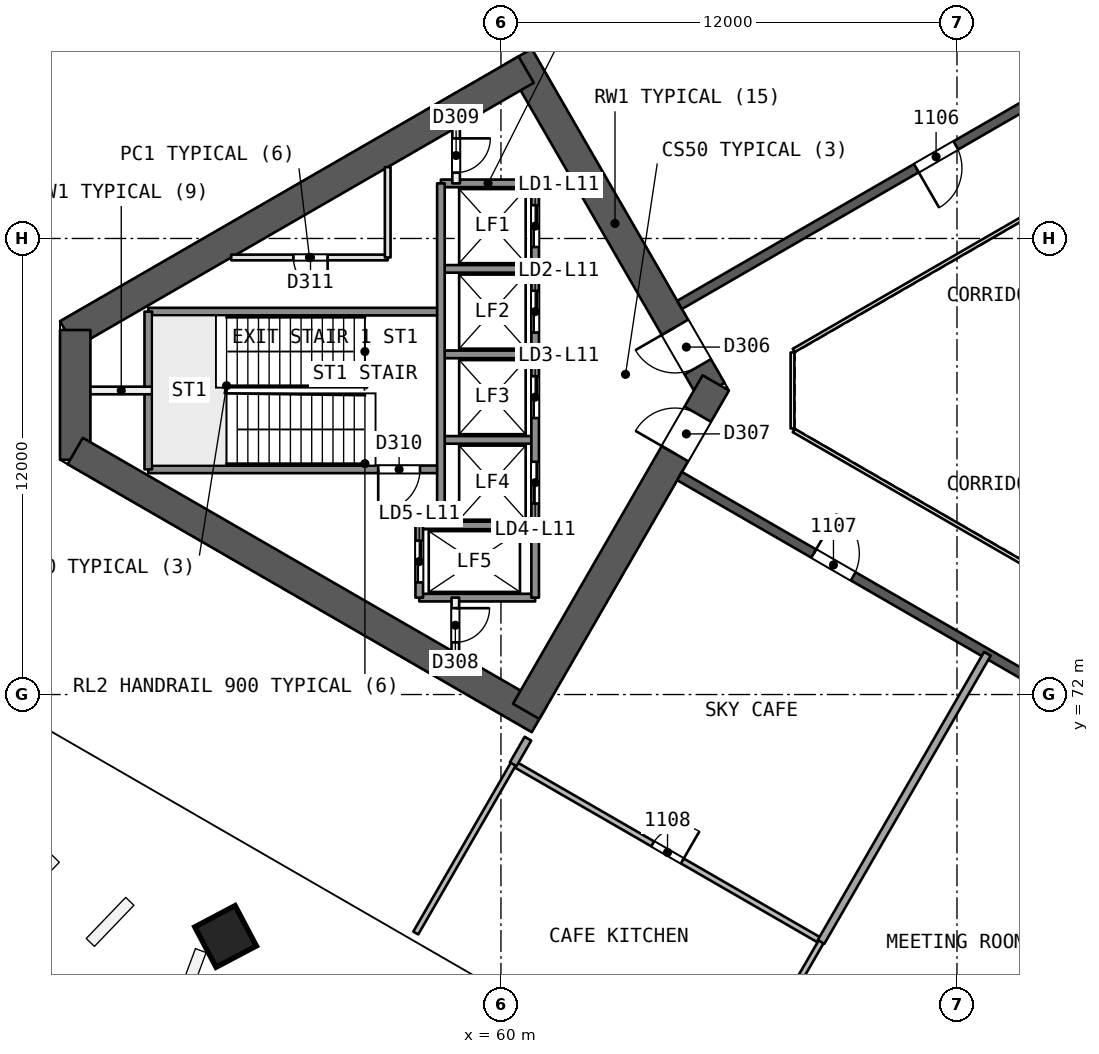
"""IFC4 building model, lengths in metres.
Left out: names, types, materials, properties, quantities, classifications, styles, units other than length and angle.
Written with IfcOpenShell. Run it as: python <this file> out.ifc"""

import sys

from ifc_helpers import new_model, si_unit, direction, frame, frame_2d, origin, origin_2d, place, context, subcontext, project, spatial, rectangle, extrude, element, fill, save


model = new_model("IFC4")
c1 = context("Model", 3, precision=1e-05, world=origin(), true_north=direction((0.0, 1.0)))
c2 = subcontext(c1, "Body", "Model", "MODEL_VIEW")
j1 = project(units=[si_unit("LENGTHUNIT", "METRE"), si_unit("PLANEANGLEUNIT", "RADIAN")], contexts=[c1])
p1 = place(None, origin())
s1 = spatial("IfcSite", under=j1, at=p1, CompositionType="ELEMENT")
p2 = place(p1, origin())
s2 = spatial("IfcBuilding", under=s1, at=p2, CompositionType="ELEMENT")
p3 = place(p2, frame((0.0, 0.0, 52.9)))
s3 = spatial("IfcBuildingStorey", under=s2, at=p3, CompositionType="ELEMENT", Elevation=52.9)
p4 = place(p3, frame((65.538, 80.0, 0.0), z_axis=(0.0, 0.0, 1.0), x_axis=(-0.49999662545, 0.866027352073, 0.0)))
e1 = element("IfcWall", 1, at=p4, inside=s3, PredefinedType="SHEAR", context=c2, shape_type="SweptSolid", body=[
    extrude(rectangle(XDim=10.149, YDim=0.8, at=frame_2d((5.074, 0.0))), origin(), (0.0, 0.0, 1.0), 4.4),
])
p5 = place(p4, frame((0.719, 0.0, 0.0)))
e2 = element("IfcOpeningElement", 2, at=p5, cuts=e1, PredefinedType="OPENING", context=c2, shape_type="SweptSolid", body=[
    extrude(rectangle(XDim=1.2, YDim=2.1, at=frame_2d((0.6, 1.05))), frame((0.0, 0.411, 0.0), z_axis=(0.0, -1.0, 0.0), x_axis=(1.0, 0.0, 0.0)), (0.0, 0.0, 1.0), 0.821),
])
p6 = place(p3, frame((60.664, 88.443, 0.0), z_axis=(0.0, 0.0, 1.0), x_axis=(-0.866029478545, -0.499992942241, 0.0)))
e3 = element("IfcWall", 3, at=p6, inside=s3, PredefinedType="SHEAR", context=c2, shape_type="SweptSolid", body=[
    extrude(rectangle(XDim=13.933, YDim=0.8, at=frame_2d((6.967, 0.0))), origin(), (0.0, 0.0, 1.0), 4.4),
])
p7 = place(p3, frame((48.797, 81.592, 0.0), z_axis=(0.0, 0.0, 1.0), x_axis=(0.0, -1.0, 0.0)))
e4 = element("IfcWall", 4, at=p7, inside=s3, PredefinedType="SHEAR", context=c2, shape_type="SweptSolid", body=[
    extrude(rectangle(XDim=3.415, YDim=0.8, at=frame_2d((1.707, 0.0))), origin(), (0.0, 0.0, 1.0), 4.4),
])
p8 = place(p3, frame((48.797, 78.408, 0.0), z_axis=(0.0, 0.0, 1.0), x_axis=(0.866032504327, -0.499987701298, 0.0)))
e5 = element("IfcWall", 5, at=p8, inside=s3, PredefinedType="SHEAR", context=c2, shape_type="SweptSolid", body=[
    extrude(rectangle(XDim=14.102, YDim=0.8, at=frame_2d((7.051, 0.0))), origin(), (0.0, 0.0, 1.0), 4.4),
])
p9 = place(p3, frame((60.664, 71.557, 0.0), z_axis=(0.0, 0.0, 1.0), x_axis=(0.50000409368, 0.866023040284, 0.0)))
e6 = element("IfcWall", 6, at=p9, inside=s3, PredefinedType="SHEAR", context=c2, shape_type="SweptSolid", body=[
    extrude(rectangle(XDim=9.98, YDim=0.8, at=frame_2d((4.99, 0.0))), origin(), (0.0, 0.0, 1.0), 4.4),
])
p10 = place(p9, frame((7.83, 0.0, 0.0)))
e7 = element("IfcOpeningElement", 7, at=p10, cuts=e6, PredefinedType="OPENING", context=c2, shape_type="SweptSolid", body=[
    extrude(rectangle(XDim=1.2, YDim=2.1, at=frame_2d((0.6, 1.05))), frame((0.0, 0.411, 0.0), z_axis=(0.0, -1.0, 0.0), x_axis=(1.0, 0.0, 0.0)), (0.0, 0.0, 1.0), 0.821),
])
p11 = place(p3, frame((78.2, 90.046, 0.0), z_axis=(0.0, 0.0, 1.0), x_axis=(-0.866026492143, -0.499998114903, 0.0)))
e8 = element("IfcWall", 8, at=p11, inside=s3, PredefinedType="SHEAR", context=c2, shape_type="SweptSolid", body=[
    extrude(rectangle(XDim=15.588, YDim=0.25, at=frame_2d((7.794, 0.0))), origin(), (0.0, 0.0, 1.0), 3.9),
])
p12 = place(p11, frame((7.194, 0.0, 0.0)))
e9 = element("IfcOpeningElement", 9, at=p12, cuts=e8, PredefinedType="OPENING", context=c2, shape_type="SweptSolid", body=[
    extrude(rectangle(XDim=1.2, YDim=2.4, at=frame_2d((0.6, 1.2))), frame((0.0, 0.135, 0.0), z_axis=(0.0, -1.0, 0.0), x_axis=(1.0, 0.0, 0.0)), (0.0, 0.0, 1.0), 0.271),
])
p13 = place(p3, frame((64.7, 77.748, 0.0), z_axis=(0.0, 0.0, 1.0), x_axis=(0.866026492143, -0.499998114903, 0.0)))
e10 = element("IfcWall", 10, at=p13, inside=s3, PredefinedType="SHEAR", context=c2, shape_type="SweptSolid", body=[
    extrude(rectangle(XDim=15.588, YDim=0.25, at=frame_2d((7.794, 0.0))), origin(), (0.0, 0.0, 1.0), 3.9),
])
p14 = place(p13, frame((4.076, 0.0, 0.0)))
e11 = element("IfcOpeningElement", 11, at=p14, cuts=e10, PredefinedType="OPENING", context=c2, shape_type="SweptSolid", body=[
    extrude(rectangle(XDim=1.2, YDim=2.4, at=frame_2d((0.6, 1.2))), frame((0.0, 0.135, 0.0), z_axis=(0.0, -1.0, 0.0), x_axis=(1.0, 0.0, 0.0)), (0.0, 0.0, 1.0), 0.271),
])
p15 = place(p13, frame((11.871, 0.0, 0.0)))
e12 = element("IfcOpeningElement", 12, at=p15, cuts=e10, PredefinedType="OPENING", context=c2, shape_type="SweptSolid", body=[
    extrude(rectangle(XDim=1.2, YDim=2.4, at=frame_2d((0.6, 1.2))), frame((0.0, 0.135, 0.0), z_axis=(0.0, -1.0, 0.0), x_axis=(1.0, 0.0, 0.0)), (0.0, 0.0, 1.0), 0.271),
])
p16 = place(p3, frame((52.731, 65.62, 0.0), z_axis=(0.019303638282, 0.012147979264, 0.999739864239), x_axis=(-0.866164087887, 0.499646157015, 0.010653198369)))
e13 = element("IfcColumn", 13, at=p16, inside=s3, PredefinedType="COLUMN", context=c2, shape_type="SweptSolid", body=[
    extrude(rectangle(XDim=1.2, YDim=1.2, at=origin_2d()), origin(), (0.0, 0.0, 1.0), 4.401),
])
p17 = place(p3, frame((60.333, 70.184, 0.0), z_axis=(0.0, 0.0, 1.0), x_axis=(0.866029102363, -0.49999359382, 0.0)))
e14 = element("IfcWall", 14, at=p17, inside=s3, PredefinedType="PARTITIONING", context=c2, shape_type="SweptSolid", body=[
    extrude(rectangle(XDim=9.353, YDim=0.15, at=frame_2d((4.677, 0.0))), origin(), (0.0, 0.0, 1.0), 3.9),
])
p18 = place(p17, frame((4.227, 0.0, 0.0)))
e15 = element("IfcOpeningElement", 15, at=p18, cuts=e14, PredefinedType="OPENING", context=c2, shape_type="SweptSolid", body=[
    extrude(rectangle(XDim=0.9, YDim=2.1, at=frame_2d((0.45, 1.05))), frame((0.0, 0.085, 0.0), z_axis=(0.0, -1.0, 0.0), x_axis=(1.0, 0.0, 0.0)), (0.0, 0.0, 1.0), 0.171),
])
p19 = place(p3, frame((68.423, 65.49, 0.0), z_axis=(0.0, 0.0, 1.0), x_axis=(0.499999262521, 0.866025829568, 0.0)))
e16 = element("IfcWall", 16, at=p19, inside=s3, PredefinedType="PARTITIONING", context=c2, shape_type="SweptSolid", body=[
    extrude(rectangle(XDim=8.754, YDim=0.2, at=frame_2d((4.377, 0.0))), origin(), (0.0, 0.0, 1.0), 3.9),
])
p20 = place(p3, frame((60.323, 70.167, 0.0), z_axis=(0.0, 0.0, 1.0), x_axis=(0.499931386026, 0.866065014457, 0.0)))
e17 = element("IfcWall", 17, at=p20, inside=s3, PredefinedType="PARTITIONING", context=c2, shape_type="SweptSolid", body=[
    extrude(rectangle(XDim=0.775, YDim=0.2, at=frame_2d((0.388, 0.0))), origin(), (0.0, 0.0, 1.0), 3.9),
])
for number, where, z_axis, x_axis in (
    (18, (65.858, 61.048, 0.0), (0.0, 0.0, 1.0), (0.5, 0.866, 0.0)),
    (19, (57.758, 65.725, 0.0), (0.0, 0.0, 1.0), (0.5, 0.866, 0.0)),
):
    element("IfcWall", number, at=place(p3, frame(where, z_axis=z_axis, x_axis=x_axis)), inside=s3, PredefinedType="PARTITIONING", context=c2, shape_type="SweptSolid", body=[
        extrude(rectangle(XDim=5.169, YDim=0.15, at=frame_2d((2.585, 0.0))), origin(), (0.0, 0.0, 1.0), 3.9),
    ])
p21 = place(p3, frame((60.9, 85.45, 0.0), z_axis=(0.0, 0.0, 1.0), x_axis=(-1.0, 0.0, 0.0)))
e20 = element("IfcWall", 20, at=p21, inside=s3, PredefinedType="SOLIDWALL", context=c2, shape_type="SweptSolid", body=[
    extrude(rectangle(XDim=2.48, YDim=0.2, at=frame_2d((1.24, 0.0))), origin(), (0.0, 0.0, 1.0), 3.9),
])
p22 = place(p3, frame((57.02, 83.5, 0.0), z_axis=(0.0, 0.0, 1.0), x_axis=(-1.0, 0.0, 0.0)))
e21 = element("IfcWall", 21, at=p22, inside=s3, PredefinedType="PARTITIONING", context=c2, shape_type="SweptSolid", body=[
    extrude(rectangle(XDim=4.118, YDim=0.15, at=frame_2d((2.059, 0.0))), origin(), (0.0, 0.0, 1.0), 3.9),
])
p23 = place(p22, frame((1.582, 0.0, 0.0)))
e22 = element("IfcOpeningElement", 22, at=p23, cuts=e21, PredefinedType="OPENING", context=c2, shape_type="SweptSolid", body=[
    extrude(rectangle(XDim=0.9, YDim=2.1, at=frame_2d((0.45, 1.05))), frame((0.0, 0.085, 0.0), z_axis=(0.0, -1.0, 0.0), x_axis=(1.0, 0.0, 0.0)), (0.0, 0.0, 1.0), 0.171),
])
p24 = place(p3, frame((60.9, 83.2, 0.0), z_axis=(0.0, 0.0, 1.0), x_axis=(-1.0, 0.0, 0.0)))
e23 = element("IfcWall", 23, at=p24, inside=s3, PredefinedType="SOLIDWALL", context=c2, shape_type="SweptSolid", body=[
    extrude(rectangle(XDim=2.48, YDim=0.2, at=frame_2d((1.24, 0.0))), origin(), (0.0, 0.0, 1.0), 3.9),
])
p25 = place(p3, frame((58.42, 82.075, 0.0), z_axis=(0.0, 0.0, 1.0), x_axis=(-1.0, 0.0, 0.0)))
e24 = element("IfcWall", 24, at=p25, inside=s3, PredefinedType="SOLIDWALL", context=c2, shape_type="SweptSolid", body=[
    extrude(rectangle(XDim=7.7, YDim=0.2, at=frame_2d((3.85, 0.0))), origin(), (0.0, 0.0, 1.0), 3.9),
])
p26 = place(p3, frame((60.9, 80.95, 0.0), z_axis=(0.0, 0.0, 1.0), x_axis=(-1.0, 0.0, 0.0)))
e25 = element("IfcWall", 25, at=p26, inside=s3, PredefinedType="SOLIDWALL", context=c2, shape_type="SweptSolid", body=[
    extrude(rectangle(XDim=2.48, YDim=0.2, at=frame_2d((1.24, 0.0))), origin(), (0.0, 0.0, 1.0), 3.9),
])
p27 = place(p3, frame((50.82, 80.0, 0.0), z_axis=(0.0, 0.0, 1.0), x_axis=(-1.0, 0.0, 0.0)))
e26 = element("IfcWall", 26, at=p27, inside=s3, PredefinedType="PARTITIONING", context=c2, shape_type="SweptSolid", body=[
    extrude(rectangle(XDim=1.623, YDim=0.2, at=frame_2d((0.812, 0.0))), origin(), (0.0, 0.0, 1.0), 3.9),
])
p28 = place(p3, frame((60.9, 78.7, 0.0), z_axis=(0.0, 0.0, 1.0), x_axis=(-1.0, 0.0, 0.0)))
e27 = element("IfcWall", 27, at=p28, inside=s3, PredefinedType="SOLIDWALL", context=c2, shape_type="SweptSolid", body=[
    extrude(rectangle(XDim=2.48, YDim=0.2, at=frame_2d((1.24, 0.0))), origin(), (0.0, 0.0, 1.0), 3.9),
])
p29 = place(p3, frame((58.42, 77.925, 0.0), z_axis=(0.0, 0.0, 1.0), x_axis=(-1.0, 0.0, 0.0)))
e28 = element("IfcWall", 28, at=p29, inside=s3, PredefinedType="SOLIDWALL", context=c2, shape_type="SweptSolid", body=[
    extrude(rectangle(XDim=7.7, YDim=0.2, at=frame_2d((3.85, 0.0))), origin(), (0.0, 0.0, 1.0), 3.9),
])
p30 = place(p29, frame((0.55, 0.0, 0.0)))
e29 = element("IfcOpeningElement", 29, at=p30, cuts=e28, PredefinedType="OPENING", context=c2, shape_type="SweptSolid", body=[
    extrude(rectangle(XDim=1.1, YDim=2.1, at=frame_2d((0.55, 1.05))), frame((0.0, 0.11, 0.0), z_axis=(0.0, -1.0, 0.0), x_axis=(1.0, 0.0, 0.0)), (0.0, 0.0, 1.0), 0.221),
])
for number, where, z_axis, x_axis in (
    (30, (60.9, 76.45, 0.0), (0.0, 0.0, 1.0), (-1.0, 0.0, 0.0)),
    (31, (60.9, 74.55, 0.0), (0.0, 0.0, 1.0), (-1.0, 0.0, 0.0)),
):
    element("IfcWall", number, at=place(p3, frame(where, z_axis=z_axis, x_axis=x_axis)), inside=s3, PredefinedType="SOLIDWALL", context=c2, shape_type="SweptSolid", body=[
        extrude(rectangle(XDim=3.05, YDim=0.2, at=frame_2d((1.525, 0.0))), origin(), (0.0, 0.0, 1.0), 3.9),
    ])
p31 = place(p3, frame((60.9, 85.45, 0.0), z_axis=(0.0, 0.0, 1.0), x_axis=(0.0, -1.0, 0.0)))
e32 = element("IfcWall", 32, at=p31, inside=s3, PredefinedType="SOLIDWALL", context=c2, shape_type="SweptSolid", body=[
    extrude(rectangle(XDim=10.9, YDim=0.2, at=frame_2d((5.45, 0.0))), origin(), (0.0, 0.0, 1.0), 3.9),
])
p32 = place(p31, frame((0.575, 0.0, 0.0)))
e33 = element("IfcOpeningElement", 33, at=p32, cuts=e32, PredefinedType="OPENING", context=c2, shape_type="SweptSolid", body=[
    extrude(rectangle(XDim=1.1, YDim=2.1, at=frame_2d((0.55, 1.05))), frame((0.0, 0.11, 0.0), z_axis=(0.0, -1.0, 0.0), x_axis=(1.0, 0.0, 0.0)), (0.0, 0.0, 1.0), 0.221),
])
p33 = place(p31, frame((2.825, 0.0, 0.0)))
e34 = element("IfcOpeningElement", 34, at=p33, cuts=e32, PredefinedType="OPENING", context=c2, shape_type="SweptSolid", body=[
    extrude(rectangle(XDim=1.1, YDim=2.1, at=frame_2d((0.55, 1.05))), frame((0.0, 0.11, 0.0), z_axis=(0.0, -1.0, 0.0), x_axis=(1.0, 0.0, 0.0)), (0.0, 0.0, 1.0), 0.221),
])
p34 = place(p31, frame((5.075, 0.0, 0.0)))
e35 = element("IfcOpeningElement", 35, at=p34, cuts=e32, PredefinedType="OPENING", context=c2, shape_type="SweptSolid", body=[
    extrude(rectangle(XDim=1.1, YDim=2.1, at=frame_2d((0.55, 1.05))), frame((0.0, 0.11, 0.0), z_axis=(0.0, -1.0, 0.0), x_axis=(1.0, 0.0, 0.0)), (0.0, 0.0, 1.0), 0.221),
])
p35 = place(p31, frame((7.325, 0.0, 0.0)))
e36 = element("IfcOpeningElement", 36, at=p35, cuts=e32, PredefinedType="OPENING", context=c2, shape_type="SweptSolid", body=[
    extrude(rectangle(XDim=1.1, YDim=2.1, at=frame_2d((0.55, 1.05))), frame((0.0, 0.11, 0.0), z_axis=(0.0, -1.0, 0.0), x_axis=(1.0, 0.0, 0.0)), (0.0, 0.0, 1.0), 0.221),
])
p36 = place(p3, frame((58.82, 86.917, 0.0), z_axis=(0.0, 0.0, 1.0), x_axis=(0.0, -1.0, 0.0)))
e37 = element("IfcWall", 37, at=p36, inside=s3, PredefinedType="PARTITIONING", context=c2, shape_type="SweptSolid", body=[
    extrude(rectangle(XDim=1.467, YDim=0.2, at=frame_2d((0.733, 0.0))), origin(), (0.0, 0.0, 1.0), 3.9),
])
p37 = place(p36, frame((0.283, 0.0, 0.0)))
e38 = element("IfcOpeningElement", 38, at=p37, cuts=e37, PredefinedType="OPENING", context=c2, shape_type="SweptSolid", body=[
    extrude(rectangle(XDim=0.9, YDim=2.1, at=frame_2d((0.45, 1.05))), frame((0.0, 0.11, 0.0), z_axis=(0.0, -1.0, 0.0), x_axis=(1.0, 0.0, 0.0)), (0.0, 0.0, 1.0), 0.221),
])
p38 = place(p3, frame((58.8, 74.55, 0.0), z_axis=(0.0, 0.0, 1.0), x_axis=(0.0, -1.0, 0.0)))
e39 = element("IfcWall", 39, at=p38, inside=s3, PredefinedType="PARTITIONING", context=c2, shape_type="SweptSolid", body=[
    extrude(rectangle(XDim=1.455, YDim=0.2, at=frame_2d((0.728, 0.0))), origin(), (0.0, 0.0, 1.0), 3.9),
])
p39 = place(p38, frame((0.278, 0.0, 0.0)))
e40 = element("IfcOpeningElement", 40, at=p39, cuts=e39, PredefinedType="OPENING", context=c2, shape_type="SweptSolid", body=[
    extrude(rectangle(XDim=0.9, YDim=2.1, at=frame_2d((0.45, 1.05))), frame((0.0, 0.11, 0.0), z_axis=(0.0, -1.0, 0.0), x_axis=(1.0, 0.0, 0.0)), (0.0, 0.0, 1.0), 0.221),
])
p40 = place(p3, frame((58.42, 85.45, 0.0), z_axis=(0.0, 0.0, 1.0), x_axis=(0.0, -1.0, 0.0)))
e41 = element("IfcWall", 41, at=p40, inside=s3, PredefinedType="SOLIDWALL", context=c2, shape_type="SweptSolid", body=[
    extrude(rectangle(XDim=9.0, YDim=0.2, at=frame_2d((4.5, 0.0))), origin(), (0.0, 0.0, 1.0), 3.9),
])
p41 = place(p3, frame((57.85, 76.45, 0.0), z_axis=(0.0, 0.0, 1.0), x_axis=(0.0, -1.0, 0.0)))
e42 = element("IfcWall", 42, at=p41, inside=s3, PredefinedType="SOLIDWALL", context=c2, shape_type="SweptSolid", body=[
    extrude(rectangle(XDim=1.9, YDim=0.2, at=frame_2d((0.95, 0.0))), origin(), (0.0, 0.0, 1.0), 3.9),
])
p42 = place(p41, frame((0.4, 0.0, 0.0)))
e43 = element("IfcOpeningElement", 43, at=p42, cuts=e42, PredefinedType="OPENING", context=c2, shape_type="SweptSolid", body=[
    extrude(rectangle(XDim=1.1, YDim=2.1, at=frame_2d((0.55, 1.05))), frame((0.0, 0.11, 0.0), z_axis=(0.0, -1.0, 0.0), x_axis=(1.0, 0.0, 0.0)), (0.0, 0.0, 1.0), 0.221),
])
p43 = place(p3, frame((57.02, 85.877, 0.0), z_axis=(0.0, 0.0, 1.0), x_axis=(0.0, -1.0, 0.0)))
e44 = element("IfcWall", 44, at=p43, inside=s3, PredefinedType="PARTITIONING", context=c2, shape_type="SweptSolid", body=[
    extrude(rectangle(XDim=2.377, YDim=0.15, at=frame_2d((1.189, 0.0))), origin(), (0.0, 0.0, 1.0), 3.9),
])
p44 = place(p3, frame((50.72, 82.075, 0.0), z_axis=(0.0, 0.0, 1.0), x_axis=(0.0, -1.0, 0.0)))
e45 = element("IfcWall", 45, at=p44, inside=s3, PredefinedType="SOLIDWALL", context=c2, shape_type="SweptSolid", body=[
    extrude(rectangle(XDim=4.15, YDim=0.2, at=frame_2d((2.075, 0.0))), origin(), (0.0, 0.0, 1.0), 3.9),
])
p45 = place(p3, frame((77.738, 86.846, 0.0), z_axis=(0.0, 0.0, 1.0), x_axis=(-0.866026658274, -0.499997827154, 0.0)))
e46 = element("IfcWall", 46, at=p45, inside=s3, PredefinedType="PARTITIONING", context=c2, shape_type="SweptSolid", body=[
    extrude(rectangle(XDim=11.588, YDim=0.1, at=frame_2d((5.794, 0.0))), origin(), (0.0, 0.0, 1.0), 3.9),
])
p46 = place(p3, frame((67.672, 81.0, 0.0), z_axis=(0.0, 0.0, 1.0), x_axis=(0.0, -1.0, 0.0)))
e47 = element("IfcWall", 47, at=p46, inside=s3, PredefinedType="PARTITIONING", context=c2, shape_type="SweptSolid", body=[
    extrude(rectangle(XDim=2.0, YDim=0.1, at=frame_2d((1.0, 0.0))), origin(), (0.0, 0.0, 1.0), 3.9),
])
p47 = place(p3, frame((67.702, 78.948, 0.0), z_axis=(0.0, 0.0, 1.0), x_axis=(0.866026658274, -0.499997827154, 0.0)))
e48 = element("IfcWall", 48, at=p47, inside=s3, PredefinedType="PARTITIONING", context=c2, shape_type="SweptSolid", body=[
    extrude(rectangle(XDim=11.588, YDim=0.1, at=frame_2d((5.794, 0.0))), origin(), (0.0, 0.0, 1.0), 3.9),
])
p48 = place(p12, origin())
e49 = element("IfcDoor", 49, at=p48, inside=s3, OperationType="SINGLE_SWING_RIGHT", PredefinedType="NOTDEFINED", context=c2, shape_type="SweptSolid", body=[
    extrude(rectangle(XDim=1.2, YDim=2.4, at=frame_2d((0.6, 1.2))), frame((0.0, 0.025, 0.0), z_axis=(0.0, -1.0, 0.0), x_axis=(1.0, 0.0, 0.0)), (0.0, 0.0, 1.0), 0.05),
])
fill(e9, e49)
p49 = place(p14, origin())
e50 = element("IfcDoor", 50, at=p49, inside=s3, OperationType="SINGLE_SWING_LEFT", PredefinedType="NOTDEFINED", context=c2, shape_type="SweptSolid", body=[
    extrude(rectangle(XDim=1.2, YDim=2.4, at=frame_2d((0.6, 1.2))), frame((0.0, 0.025, 0.0), z_axis=(0.0, -1.0, 0.0), x_axis=(1.0, 0.0, 0.0)), (0.0, 0.0, 1.0), 0.05),
])
fill(e11, e50)
p50 = place(p18, origin())
e51 = element("IfcDoor", 51, at=p50, inside=s3, OperationType="SINGLE_SWING_RIGHT", PredefinedType="NOTDEFINED", context=c2, shape_type="SweptSolid", body=[
    extrude(rectangle(XDim=0.9, YDim=2.1, at=frame_2d((0.45, 1.05))), frame((0.0, 0.025, 0.0), z_axis=(0.0, -1.0, 0.0), x_axis=(1.0, 0.0, 0.0)), (0.0, 0.0, 1.0), 0.05),
])
fill(e15, e51)
p51 = place(p5, origin())
e52 = element("IfcDoor", 52, at=p51, inside=s3, OperationType="SINGLE_SWING_RIGHT", PredefinedType="NOTDEFINED", context=c2, shape_type="SweptSolid", body=[
    extrude(rectangle(XDim=1.2, YDim=2.1, at=frame_2d((0.6, 1.05))), frame((0.0, 0.025, 0.0), z_axis=(0.0, -1.0, 0.0), x_axis=(1.0, 0.0, 0.0)), (0.0, 0.0, 1.0), 0.05),
])
fill(e2, e52)
p52 = place(p10, origin())
e53 = element("IfcDoor", 53, at=p52, inside=s3, OperationType="SINGLE_SWING_LEFT", PredefinedType="NOTDEFINED", context=c2, shape_type="SweptSolid", body=[
    extrude(rectangle(XDim=1.2, YDim=2.1, at=frame_2d((0.6, 1.05))), frame((0.0, 0.025, 0.0), z_axis=(0.0, -1.0, 0.0), x_axis=(1.0, 0.0, 0.0)), (0.0, 0.0, 1.0), 0.05),
])
fill(e7, e53)
p53 = place(p32, origin())
e54 = element("IfcDoor", 54, at=p53, inside=s3, OperationType="SLIDING_TO_RIGHT", PredefinedType="NOTDEFINED", context=c2, shape_type="SweptSolid", body=[
    extrude(rectangle(XDim=1.1, YDim=2.1, at=frame_2d((0.55, 1.05))), frame((0.0, 0.025, 0.0), z_axis=(0.0, -1.0, 0.0), x_axis=(1.0, 0.0, 0.0)), (0.0, 0.0, 1.0), 0.05),
])
fill(e33, e54)
p54 = place(p33, origin())
e55 = element("IfcDoor", 55, at=p54, inside=s3, OperationType="SLIDING_TO_LEFT", PredefinedType="NOTDEFINED", context=c2, shape_type="SweptSolid", body=[
    extrude(rectangle(XDim=1.1, YDim=2.1, at=frame_2d((0.55, 1.05))), frame((0.0, 0.025, 0.0), z_axis=(0.0, -1.0, 0.0), x_axis=(1.0, 0.0, 0.0)), (0.0, 0.0, 1.0), 0.05),
])
fill(e34, e55)
p55 = place(p34, origin())
e56 = element("IfcDoor", 56, at=p55, inside=s3, OperationType="SLIDING_TO_RIGHT", PredefinedType="NOTDEFINED", context=c2, shape_type="SweptSolid", body=[
    extrude(rectangle(XDim=1.1, YDim=2.1, at=frame_2d((0.55, 1.05))), frame((0.0, 0.025, 0.0), z_axis=(0.0, -1.0, 0.0), x_axis=(1.0, 0.0, 0.0)), (0.0, 0.0, 1.0), 0.05),
])
fill(e35, e56)
p56 = place(p35, origin())
e57 = element("IfcDoor", 57, at=p56, inside=s3, OperationType="SLIDING_TO_LEFT", PredefinedType="NOTDEFINED", context=c2, shape_type="SweptSolid", body=[
    extrude(rectangle(XDim=1.1, YDim=2.1, at=frame_2d((0.55, 1.05))), frame((0.0, 0.025, 0.0), z_axis=(0.0, -1.0, 0.0), x_axis=(1.0, 0.0, 0.0)), (0.0, 0.0, 1.0), 0.05),
])
fill(e36, e57)
p57 = place(p42, origin())
e58 = element("IfcDoor", 58, at=p57, inside=s3, OperationType="SLIDING_TO_RIGHT", PredefinedType="NOTDEFINED", context=c2, shape_type="SweptSolid", body=[
    extrude(rectangle(XDim=1.1, YDim=2.1, at=frame_2d((0.55, 1.05))), frame((0.0, 0.025, 0.0), z_axis=(0.0, -1.0, 0.0), x_axis=(1.0, 0.0, 0.0)), (0.0, 0.0, 1.0), 0.05),
])
fill(e43, e58)
p58 = place(p39, origin())
e59 = element("IfcDoor", 59, at=p58, inside=s3, OperationType="SINGLE_SWING_LEFT", PredefinedType="NOTDEFINED", context=c2, shape_type="SweptSolid", body=[
    extrude(rectangle(XDim=0.9, YDim=2.1, at=frame_2d((0.45, 1.05))), frame((0.0, 0.025, 0.0), z_axis=(0.0, -1.0, 0.0), x_axis=(1.0, 0.0, 0.0)), (0.0, 0.0, 1.0), 0.05),
])
fill(e40, e59)
p59 = place(p37, origin())
e60 = element("IfcDoor", 60, at=p59, inside=s3, OperationType="SINGLE_SWING_LEFT", PredefinedType="NOTDEFINED", context=c2, shape_type="SweptSolid", body=[
    extrude(rectangle(XDim=0.9, YDim=2.1, at=frame_2d((0.45, 1.05))), frame((0.0, 0.025, 0.0), z_axis=(0.0, -1.0, 0.0), x_axis=(1.0, 0.0, 0.0)), (0.0, 0.0, 1.0), 0.05),
])
fill(e38, e60)
p60 = place(p30, origin())
e61 = element("IfcDoor", 61, at=p60, inside=s3, OperationType="SINGLE_SWING_RIGHT", PredefinedType="NOTDEFINED", context=c2, shape_type="SweptSolid", body=[
    extrude(rectangle(XDim=1.1, YDim=2.1, at=frame_2d((0.55, 1.05))), frame((0.0, 0.025, 0.0), z_axis=(0.0, -1.0, 0.0), x_axis=(1.0, 0.0, 0.0)), (0.0, 0.0, 1.0), 0.05),
])
fill(e29, e61)
p61 = place(p23, origin())
e62 = element("IfcDoor", 62, at=p61, inside=s3, OperationType="SINGLE_SWING_LEFT", PredefinedType="NOTDEFINED", context=c2, shape_type="SweptSolid", body=[
    extrude(rectangle(XDim=0.9, YDim=2.1, at=frame_2d((0.45, 1.05))), frame((0.0, 0.025, 0.0), z_axis=(0.0, -1.0, 0.0), x_axis=(1.0, 0.0, 0.0)), (0.0, 0.0, 1.0), 0.05),
])
fill(e22, e62)
save(model, sys.argv[1])
